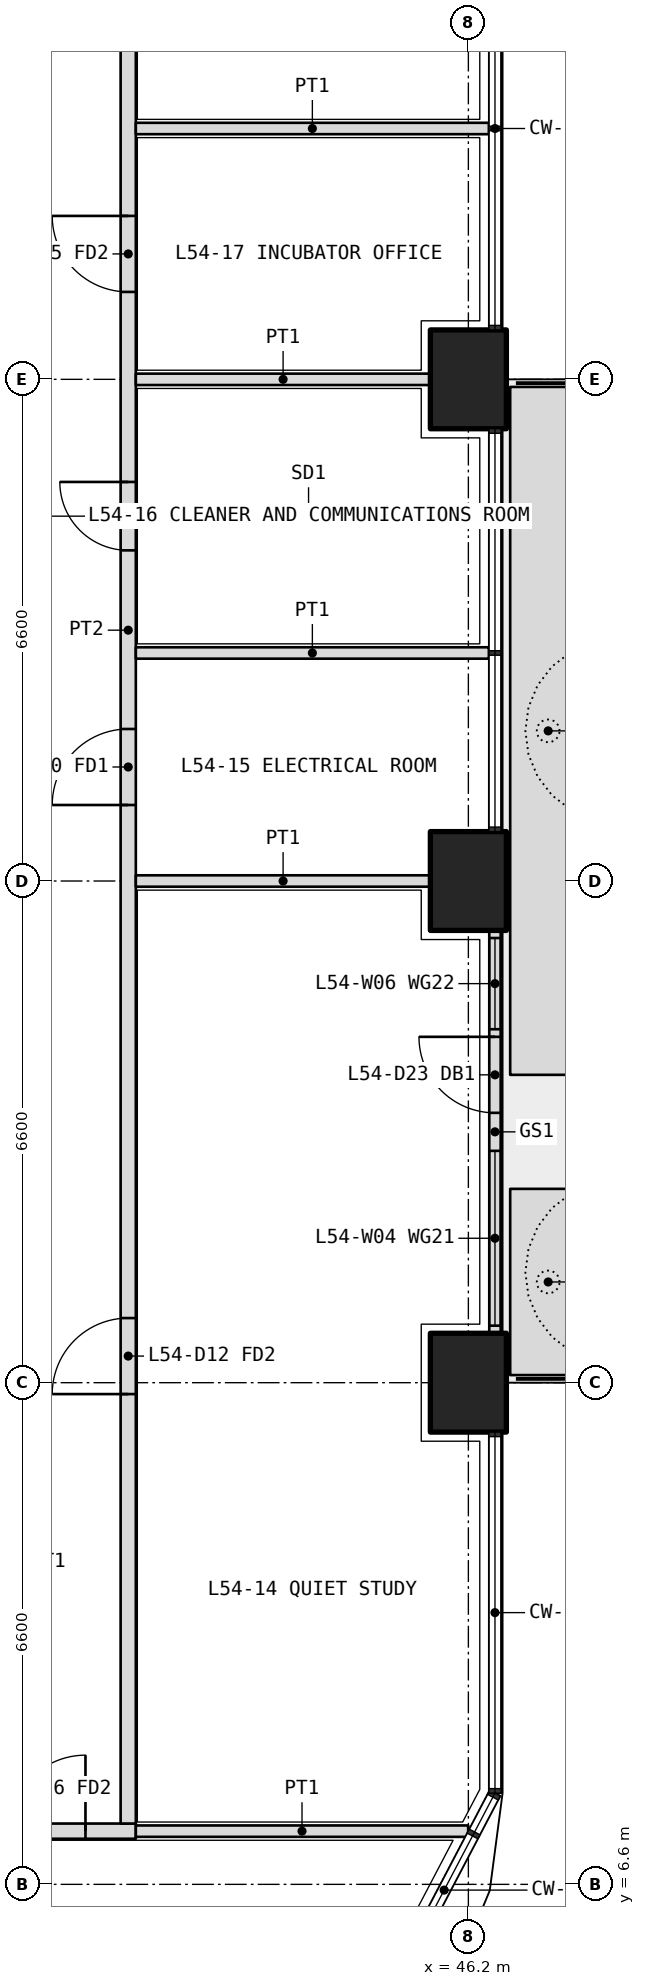
"""IFC4 building model, lengths in metres.
Left out: names, types, materials, properties, quantities, classifications, styles, units other than length and angle.
Written with IfcOpenShell. Run it as: python <this file> out.ifc"""

import sys

from ifc_helpers import new_model, si_unit, direction, frame, frame_2d, origin, origin_2d, place, context, subcontext, project, spatial, polyline, rectangle, outline, extrude, element, fill, save


model = new_model("IFC4")
c1 = context("Model", 3, precision=1e-05, world=origin(), true_north=direction((0.0, 1.0)))
c2 = subcontext(c1, "Body", "Model", "MODEL_VIEW")
j1 = project(units=[si_unit("LENGTHUNIT", "METRE"), si_unit("PLANEANGLEUNIT", "RADIAN")], contexts=[c1])
p1 = place(None, origin())
s1 = spatial("IfcSite", under=j1, at=p1, CompositionType="ELEMENT")
p2 = place(p1, origin())
s2 = spatial("IfcBuilding", under=s1, at=p2, CompositionType="ELEMENT")
p3 = place(p2, frame((0.0, 0.0, 237.6)))
s3 = spatial("IfcBuildingStorey", under=s2, at=p3, CompositionType="ELEMENT", Elevation=237.6)
for number, where, z_axis, x_axis in (
    (1, (46.2, 13.2, 0.0), (0.0, 0.0, 1.0), (0.0, 1.0, 0.0)),
    (2, (46.2, 19.8, 0.0), (0.0, 0.0, 1.0), (0.0, 1.0, 0.0)),
    (3, (46.2, 26.4, 0.0), (0.0, 0.0, 1.0), (0.0, 1.0, 0.0)),
):
    element("IfcColumn", number, at=place(p3, frame(where, z_axis=z_axis, x_axis=x_axis)), inside=s3, PredefinedType="COLUMN", context=c2, shape_type="SweptSolid", body=[
        extrude(rectangle(XDim=1.3, YDim=1.0, at=origin_2d()), origin(), (0.0, 0.0, 1.0), 4.2),
    ])
p4 = place(p3, origin())
e4 = element("IfcWall", 4, at=p4, inside=s3, PredefinedType="USERDEFINED", context=c2, shape_type="SweptSolid", body=[
    extrude(outline(polyline([(46.75, 13.3), (47.75, 13.3), (47.75, 15.75), (46.75, 15.75), (46.75, 13.3)]), holes=[polyline([(46.9, 13.45), (47.6, 13.45), (47.6, 15.6), (46.9, 15.6), (46.9, 13.45)])]), origin(), (0.0, 0.0, 1.0), 1.05),
])
p5 = place(p3, origin())
e5 = element("IfcWall", 5, at=p5, inside=s3, PredefinedType="USERDEFINED", context=c2, shape_type="SweptSolid", body=[
    extrude(outline(polyline([(46.75, 17.25), (47.75, 17.25), (47.75, 26.3), (46.75, 26.3), (46.75, 17.25)]), holes=[polyline([(46.9, 17.4), (47.6, 17.4), (47.6, 26.15), (46.9, 26.15), (46.9, 17.4)])]), origin(), (0.0, 0.0, 1.0), 1.05),
])
p6 = place(p3, frame((46.55, 13.85, 0.0), z_axis=(0.0, 0.0, 1.0), x_axis=(0.0, 1.0, 0.0)))
e6 = element("IfcWall", 6, at=p6, inside=s3, PredefinedType="SOLIDWALL", context=c2, shape_type="SweptSolid", body=[
    extrude(rectangle(XDim=5.3, YDim=0.15, at=frame_2d((2.65, 0.0))), origin(), (0.0, 0.0, 1.0), 2.7),
])
p7 = place(p6, frame((2.9, 0.0, 0.0)))
e7 = element("IfcOpeningElement", 7, at=p7, cuts=e6, PredefinedType="OPENING", context=c2, shape_type="SweptSolid", body=[
    extrude(rectangle(XDim=1.0, YDim=2.4, at=frame_2d((0.5, 1.2))), frame((0.0, 0.085, 0.0), z_axis=(0.0, -1.0, 0.0), x_axis=(1.0, 0.0, 0.0)), (0.0, 0.0, 1.0), 0.17),
])
p8 = place(p6, frame((0.1, 0.0, 0.1)))
e8 = element("IfcOpeningElement", 8, at=p8, cuts=e6, PredefinedType="OPENING", context=c2, shape_type="SweptSolid", body=[
    extrude(rectangle(XDim=2.3, YDim=2.3, at=frame_2d((1.15, 1.15))), frame((0.0, 0.085, 0.0), z_axis=(0.0, -1.0, 0.0), x_axis=(1.0, 0.0, 0.0)), (0.0, 0.0, 1.0), 0.17),
])
p9 = place(p6, frame((4.0, 0.0, 0.1)))
e9 = element("IfcOpeningElement", 9, at=p9, cuts=e6, PredefinedType="OPENING", context=c2, shape_type="SweptSolid", body=[
    extrude(rectangle(XDim=1.2, YDim=2.3, at=frame_2d((0.6, 1.15))), frame((0.0, 0.085, 0.0), z_axis=(0.0, -1.0, 0.0), x_axis=(1.0, 0.0, 0.0)), (0.0, 0.0, 1.0), 0.17),
])
p10 = place(p3, frame((10.975, 7.3, 0.0), z_axis=(0.0, 0.0, 1.0), x_axis=(1.0, 0.0, 0.0)))
e10 = element("IfcWall", 10, at=p10, inside=s3, PredefinedType="PARTITIONING", context=c2, shape_type="SweptSolid", body=[
    extrude(rectangle(XDim=30.85, YDim=0.2, at=frame_2d((15.425, 0.0))), origin(), (0.0, 0.0, 1.0), 3.0),
])
p11 = place(p10, frame((2.312, 0.0, 0.0)))
e11 = element("IfcOpeningElement", 11, at=p11, cuts=e10, PredefinedType="OPENING", context=c2, shape_type="SweptSolid", body=[
    extrude(rectangle(XDim=1.0, YDim=2.1, at=frame_2d((0.5, 1.05))), frame((0.0, 0.11, 0.0), z_axis=(0.0, -1.0, 0.0), x_axis=(1.0, 0.0, 0.0)), (0.0, 0.0, 1.0), 0.22),
])
p12 = place(p10, frame((13.275, 0.0, 0.0)))
e12 = element("IfcOpeningElement", 12, at=p12, cuts=e10, PredefinedType="OPENING", context=c2, shape_type="SweptSolid", body=[
    extrude(rectangle(XDim=1.0, YDim=2.1, at=frame_2d((0.5, 1.05))), frame((0.0, 0.11, 0.0), z_axis=(0.0, -1.0, 0.0), x_axis=(1.0, 0.0, 0.0)), (0.0, 0.0, 1.0), 0.22),
])
p13 = place(p10, frame((23.625, 0.0, 0.0)))
e13 = element("IfcOpeningElement", 13, at=p13, cuts=e10, PredefinedType="OPENING", context=c2, shape_type="SweptSolid", body=[
    extrude(rectangle(XDim=1.0, YDim=2.1, at=frame_2d((0.5, 1.05))), frame((0.0, 0.11, 0.0), z_axis=(0.0, -1.0, 0.0), x_axis=(1.0, 0.0, 0.0)), (0.0, 0.0, 1.0), 0.22),
])
p14 = place(p10, frame((26.925, 0.0, 0.0)))
e14 = element("IfcOpeningElement", 14, at=p14, cuts=e10, PredefinedType="OPENING", context=c2, shape_type="SweptSolid", body=[
    extrude(rectangle(XDim=1.0, YDim=2.1, at=frame_2d((0.5, 1.05))), frame((0.0, 0.11, 0.0), z_axis=(0.0, -1.0, 0.0), x_axis=(1.0, 0.0, 0.0)), (0.0, 0.0, 1.0), 0.22),
])
p15 = place(p10, frame((29.188, 0.0, 0.0)))
e15 = element("IfcOpeningElement", 15, at=p15, cuts=e10, PredefinedType="OPENING", context=c2, shape_type="SweptSolid", body=[
    extrude(rectangle(XDim=1.0, YDim=2.1, at=frame_2d((0.5, 1.05))), frame((0.0, 0.11, 0.0), z_axis=(0.0, -1.0, 0.0), x_axis=(1.0, 0.0, 0.0)), (0.0, 0.0, 1.0), 0.22),
])
p16 = place(p3, frame((41.725, 7.4, 0.0), z_axis=(0.0, 0.0, 1.0), x_axis=(0.0, 1.0, 0.0)))
e16 = element("IfcWall", 16, at=p16, inside=s3, PredefinedType="PARTITIONING", context=c2, shape_type="SweptSolid", body=[
    extrude(rectangle(XDim=31.4, YDim=0.2, at=frame_2d((15.7, 0.0))), origin(), (0.0, 0.0, 1.0), 3.0),
])
p17 = place(p16, frame((5.65, 0.0, 0.0)))
e17 = element("IfcOpeningElement", 17, at=p17, cuts=e16, PredefinedType="OPENING", context=c2, shape_type="SweptSolid", body=[
    extrude(rectangle(XDim=1.0, YDim=2.1, at=frame_2d((0.5, 1.05))), frame((0.0, 0.11, 0.0), z_axis=(0.0, -1.0, 0.0), x_axis=(1.0, 0.0, 0.0)), (0.0, 0.0, 1.0), 0.22),
])
p18 = place(p16, frame((13.4, 0.0, 0.0)))
e18 = element("IfcOpeningElement", 18, at=p18, cuts=e16, PredefinedType="OPENING", context=c2, shape_type="SweptSolid", body=[
    extrude(rectangle(XDim=1.0, YDim=2.1, at=frame_2d((0.5, 1.05))), frame((0.0, 0.11, 0.0), z_axis=(0.0, -1.0, 0.0), x_axis=(1.0, 0.0, 0.0)), (0.0, 0.0, 1.0), 0.22),
])
p19 = place(p16, frame((16.75, 0.0, 0.0)))
e19 = element("IfcOpeningElement", 19, at=p19, cuts=e16, PredefinedType="OPENING", context=c2, shape_type="SweptSolid", body=[
    extrude(rectangle(XDim=0.9, YDim=2.1, at=frame_2d((0.45, 1.05))), frame((0.0, 0.11, 0.0), z_axis=(0.0, -1.0, 0.0), x_axis=(1.0, 0.0, 0.0)), (0.0, 0.0, 1.0), 0.22),
])
p20 = place(p16, frame((20.15, 0.0, 0.0)))
e20 = element("IfcOpeningElement", 20, at=p20, cuts=e16, PredefinedType="OPENING", context=c2, shape_type="SweptSolid", body=[
    extrude(rectangle(XDim=1.0, YDim=2.1, at=frame_2d((0.5, 1.05))), frame((0.0, 0.11, 0.0), z_axis=(0.0, -1.0, 0.0), x_axis=(1.0, 0.0, 0.0)), (0.0, 0.0, 1.0), 0.22),
])
p21 = place(p16, frame((26.4, 0.0, 0.0)))
e21 = element("IfcOpeningElement", 21, at=p21, cuts=e16, PredefinedType="OPENING", context=c2, shape_type="SweptSolid", body=[
    extrude(rectangle(XDim=1.0, YDim=2.1, at=frame_2d((0.5, 1.05))), frame((0.0, 0.11, 0.0), z_axis=(0.0, -1.0, 0.0), x_axis=(1.0, 0.0, 0.0)), (0.0, 0.0, 1.0), 0.22),
])
p22 = place(p3, frame((46.198, 7.3, 0.0), z_axis=(0.0, 0.0, 1.0), x_axis=(-1.0, 0.0, 0.0)))
e22 = element("IfcWall", 22, at=p22, inside=s3, PredefinedType="PARTITIONING", context=c2, shape_type="SweptSolid", body=[
    extrude(rectangle(XDim=4.373, YDim=0.15, at=frame_2d((2.186, 0.0))), origin(), (0.0, 0.0, 1.0), 2.7),
])
p23 = place(p3, frame((46.47, 22.8, 0.0), z_axis=(0.0, 0.0, 1.0), x_axis=(-1.0, 0.0, 0.0)))
e23 = element("IfcWall", 23, at=p23, inside=s3, PredefinedType="PARTITIONING", context=c2, shape_type="SweptSolid", body=[
    extrude(rectangle(XDim=4.645, YDim=0.15, at=frame_2d((2.323, 0.0))), origin(), (0.0, 0.0, 1.0), 2.7),
])
for number, where, z_axis, x_axis in (
    (24, (45.7, 26.4, 0.0), (0.0, 0.0, 1.0), (-1.0, 0.0, 0.0)),
    (25, (45.7, 19.8, 0.0), (0.0, 0.0, 1.0), (-1.0, 0.0, 0.0)),
):
    element("IfcWall", number, at=place(p3, frame(where, z_axis=z_axis, x_axis=x_axis)), inside=s3, PredefinedType="PARTITIONING", context=c2, shape_type="SweptSolid", body=[
        extrude(rectangle(XDim=3.875, YDim=0.15, at=frame_2d((1.938, 0.0))), origin(), (0.0, 0.0, 1.0), 3.0),
    ])
p24 = place(p3, frame((46.47, 29.7, 0.0), z_axis=(0.0, 0.0, 1.0), x_axis=(-1.0, 0.0, 0.0)))
e26 = element("IfcWall", 26, at=p24, inside=s3, PredefinedType="PARTITIONING", context=c2, shape_type="SweptSolid", body=[
    extrude(rectangle(XDim=4.645, YDim=0.15, at=frame_2d((2.323, 0.0))), origin(), (0.0, 0.0, 1.0), 2.7),
])
p25 = place(p7, origin())
e27 = element("IfcDoor", 27, at=p25, inside=s3, OperationType="SINGLE_SWING_RIGHT", PredefinedType="DOOR", context=c2, shape_type="SweptSolid", body=[
    extrude(rectangle(XDim=1.0, YDim=2.4, at=frame_2d((0.5, 1.2))), frame((0.0, 0.025, 0.0), z_axis=(0.0, -1.0, 0.0), x_axis=(1.0, 0.0, 0.0)), (0.0, 0.0, 1.0), 0.05),
])
fill(e7, e27)
p26 = place(p8, origin())
e28 = element("IfcWindow", 28, at=p26, inside=s3, PartitioningType="SINGLE_PANEL", PredefinedType="WINDOW", context=c2, shape_type="SweptSolid", body=[
    extrude(rectangle(XDim=2.3, YDim=2.3, at=frame_2d((1.15, 1.15))), frame((0.0, 0.03, 0.0), z_axis=(0.0, -1.0, 0.0), x_axis=(1.0, 0.0, 0.0)), (0.0, 0.0, 1.0), 0.06),
])
fill(e8, e28)
p27 = place(p9, origin())
e29 = element("IfcWindow", 29, at=p27, inside=s3, PartitioningType="SINGLE_PANEL", PredefinedType="WINDOW", context=c2, shape_type="SweptSolid", body=[
    extrude(rectangle(XDim=1.2, YDim=2.3, at=frame_2d((0.6, 1.15))), frame((0.0, 0.03, 0.0), z_axis=(0.0, -1.0, 0.0), x_axis=(1.0, 0.0, 0.0)), (0.0, 0.0, 1.0), 0.06),
])
fill(e9, e29)
p28 = place(p15, origin())
e30 = element("IfcDoor", 30, at=p28, inside=s3, OperationType="SINGLE_SWING_RIGHT", PredefinedType="DOOR", context=c2, shape_type="SweptSolid", body=[
    extrude(rectangle(XDim=1.0, YDim=2.1, at=frame_2d((0.5, 1.05))), frame((0.0, 0.025, 0.0), z_axis=(0.0, -1.0, 0.0), x_axis=(1.0, 0.0, 0.0)), (0.0, 0.0, 1.0), 0.05),
])
fill(e15, e30)
p29 = place(p17, origin())
e31 = element("IfcDoor", 31, at=p29, inside=s3, OperationType="SINGLE_SWING_LEFT", PredefinedType="DOOR", context=c2, shape_type="SweptSolid", body=[
    extrude(rectangle(XDim=1.0, YDim=2.1, at=frame_2d((0.5, 1.05))), frame((0.0, 0.025, 0.0), z_axis=(0.0, -1.0, 0.0), x_axis=(1.0, 0.0, 0.0)), (0.0, 0.0, 1.0), 0.05),
])
fill(e17, e31)
p30 = place(p18, origin())
e32 = element("IfcDoor", 32, at=p30, inside=s3, OperationType="SINGLE_SWING_LEFT", PredefinedType="DOOR", context=c2, shape_type="SweptSolid", body=[
    extrude(rectangle(XDim=1.0, YDim=2.1, at=frame_2d((0.5, 1.05))), frame((0.0, 0.025, 0.0), z_axis=(0.0, -1.0, 0.0), x_axis=(1.0, 0.0, 0.0)), (0.0, 0.0, 1.0), 0.05),
])
fill(e18, e32)
p31 = place(p19, origin())
e33 = element("IfcDoor", 33, at=p31, inside=s3, OperationType="SINGLE_SWING_RIGHT", PredefinedType="DOOR", context=c2, shape_type="SweptSolid", body=[
    extrude(rectangle(XDim=0.9, YDim=2.1, at=frame_2d((0.45, 1.05))), frame((0.0, 0.025, 0.0), z_axis=(0.0, -1.0, 0.0), x_axis=(1.0, 0.0, 0.0)), (0.0, 0.0, 1.0), 0.05),
])
fill(e19, e33)
p32 = place(p20, origin())
e34 = element("IfcDoor", 34, at=p32, inside=s3, OperationType="SINGLE_SWING_RIGHT", PredefinedType="DOOR", context=c2, shape_type="SweptSolid", body=[
    extrude(rectangle(XDim=1.0, YDim=2.1, at=frame_2d((0.5, 1.05))), frame((0.0, 0.025, 0.0), z_axis=(0.0, -1.0, 0.0), x_axis=(1.0, 0.0, 0.0)), (0.0, 0.0, 1.0), 0.05),
])
fill(e20, e34)
save(model, sys.argv[1])
